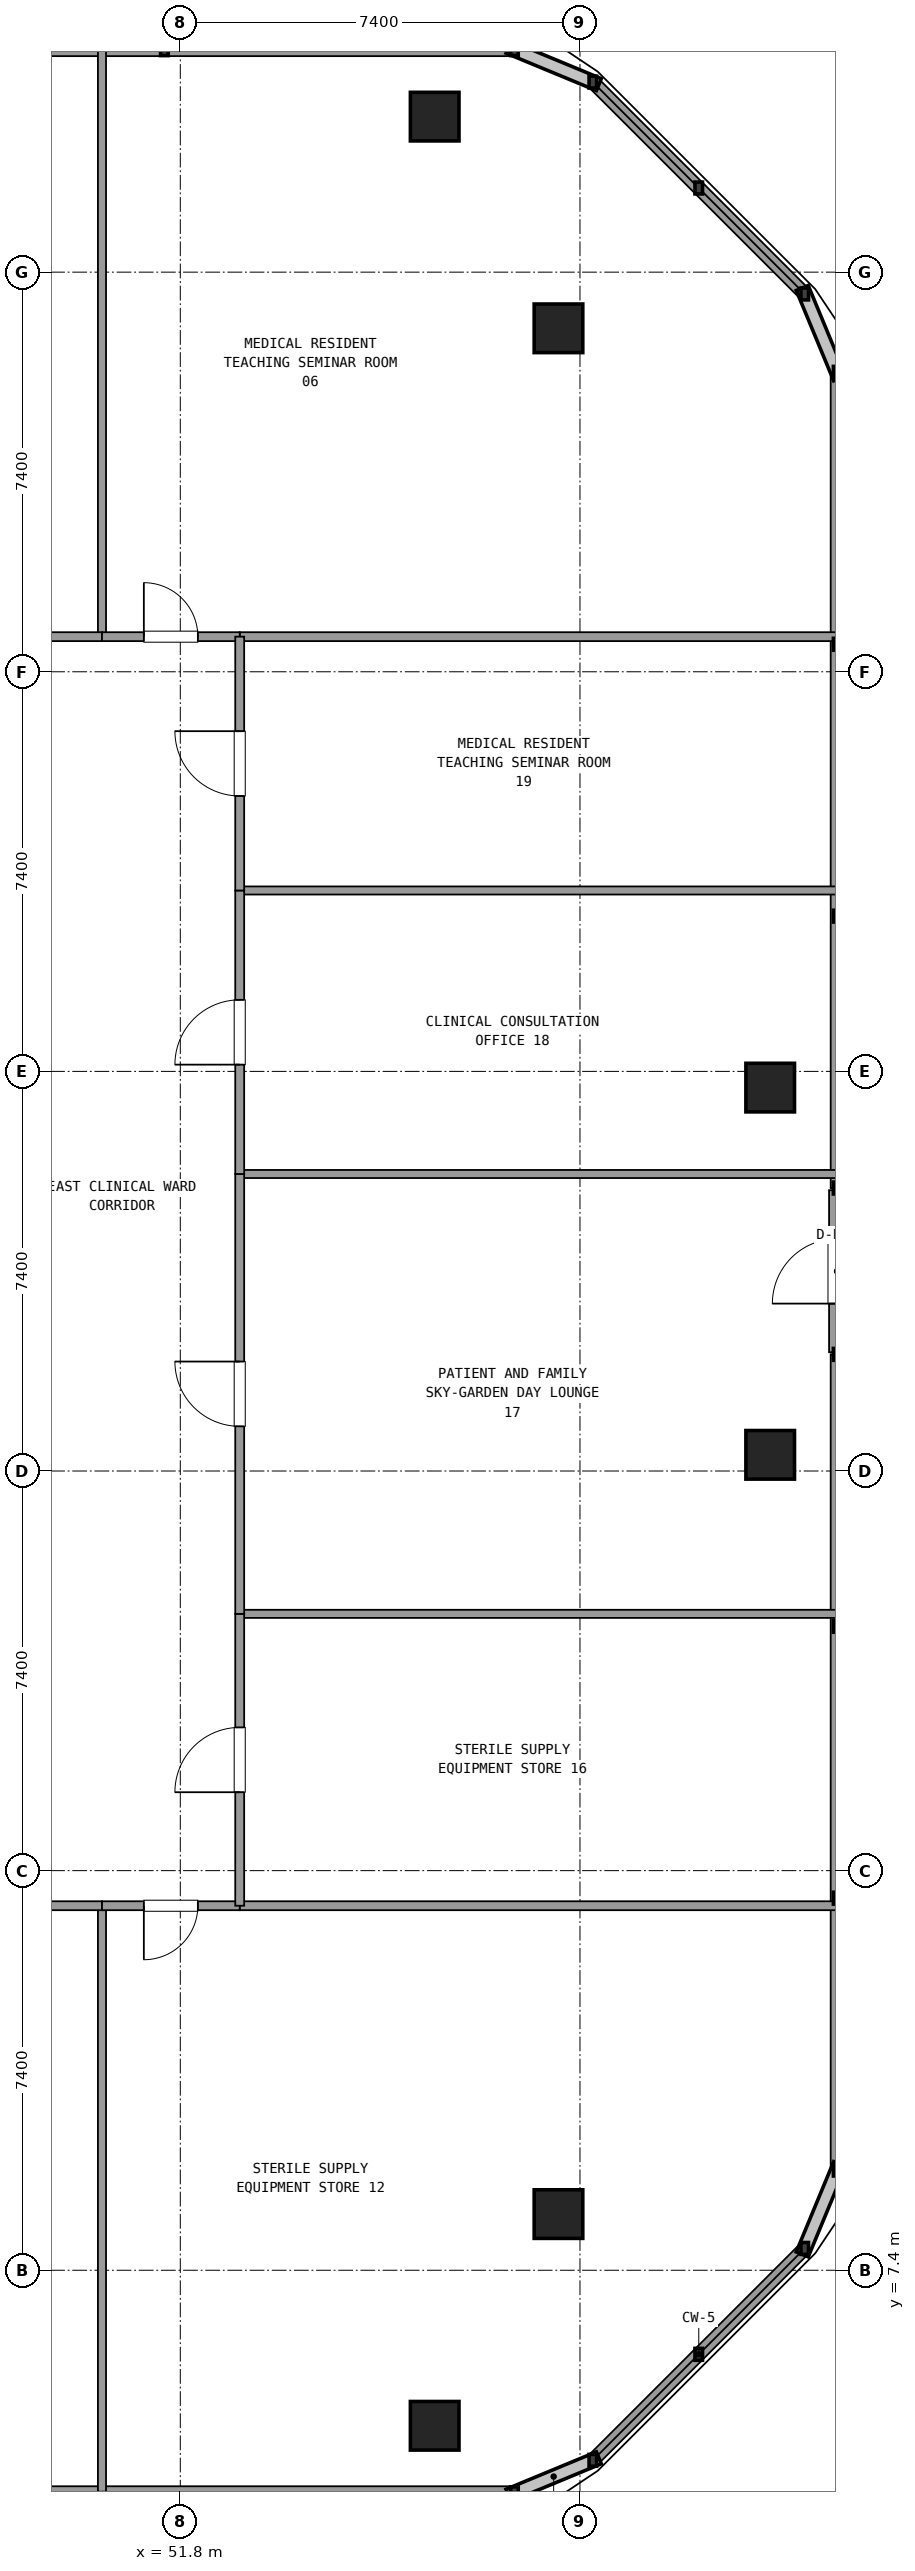
"""IFC4 building model, lengths in metres.
Left out: names, types, materials, properties, quantities, classifications, styles, units other than length and angle.
Written with IfcOpenShell. Run it as: python <this file> out.ifc"""

import sys

from ifc_helpers import new_model, si_unit, direction, frame, frame_2d, origin, origin_2d, place, context, subcontext, project, spatial, rectangle, extrude, element, fill, save


model = new_model("IFC4")
c1 = context("Model", 3, precision=1e-05, world=origin(), true_north=direction((0.0, 1.0)))
c2 = subcontext(c1, "Body", "Model", "MODEL_VIEW")
j1 = project(units=[si_unit("LENGTHUNIT", "METRE"), si_unit("PLANEANGLEUNIT", "RADIAN")], contexts=[c1])
p1 = place(None, origin())
s1 = spatial("IfcSite", under=j1, at=p1, CompositionType="ELEMENT")
p2 = place(p1, origin())
s2 = spatial("IfcBuilding", under=s1, at=p2, CompositionType="ELEMENT")
p3 = place(p2, frame((0.0, 0.0, 225.18)))
s3 = spatial("IfcBuildingStorey", under=s2, at=p3, CompositionType="ELEMENT", Elevation=225.18)
for number, where, z_axis, x_axis in (
    (1, (56.51, 4.52, 0.0), (0.0, 0.0, 1.0), (1.0, 0.0, 0.0)),
    (2, (58.802, 8.44, 0.0), (0.0, 0.0, 1.0), (1.0, 0.0, 0.0)),
    (3, (62.722, 22.5, 0.0), (0.0, 0.0, 1.0), (1.0, 0.0, 0.0)),
    (4, (62.722, 29.3, 0.0), (0.0, 0.0, 1.0), (1.0, 0.0, 0.0)),
    (5, (58.802, 43.36, 0.0), (0.0, 0.0, 1.0), (1.0, 0.0, 0.0)),
    (6, (56.51, 47.28, 0.0), (0.0, 0.0, 1.0), (1.0, 0.0, 0.0)),
):
    element("IfcColumn", number, at=place(p3, frame(where, z_axis=z_axis, x_axis=x_axis)), inside=s3, PredefinedType="COLUMN", context=c2, shape_type="SweptSolid", body=[
        extrude(rectangle(XDim=0.9, YDim=0.9, at=origin_2d()), origin(), (0.0, 0.0, 1.0), 3.6),
    ])
p4 = place(p3, frame((16.013, 3.28, 0.0), z_axis=(0.0, 0.0, 1.0), x_axis=(1.0, 0.0, 0.0)))
e7 = element("IfcWall", 7, at=p4, inside=s3, PredefinedType="SOLIDWALL", context=c2, shape_type="SweptSolid", body=[
    extrude(rectangle(XDim=41.974, YDim=0.24, at=frame_2d((20.987, 0.0))), origin(), (0.0, 0.0, 1.0), 0.85),
])
p5 = place(p3, frame((59.438, 3.881, 0.0), z_axis=(0.0, 0.0, 1.0), x_axis=(0.707128783731, 0.707084777957, 0.0)))
e8 = element("IfcWall", 8, at=p5, inside=s3, PredefinedType="SOLIDWALL", context=c2, shape_type="SweptSolid", body=[
    extrude(rectangle(XDim=5.548, YDim=0.24, at=frame_2d((2.774, 0.0))), origin(), (0.0, 0.0, 1.0), 0.85),
])
p6 = place(p3, frame((63.962, 24.4, 0.0), z_axis=(0.0, 0.0, 1.0), x_axis=(0.0, 1.0, 0.0)))
e9 = element("IfcWall", 9, at=p6, inside=s3, PredefinedType="SOLIDWALL", context=c2, shape_type="SweptSolid", body=[
    extrude(rectangle(XDim=3.0, YDim=0.3, at=frame_2d((1.5, 0.0))), origin(), (0.0, 0.0, 1.0), 2.69),
])
p7 = place(p6, frame((0.9, 0.0, 0.0)))
e10 = element("IfcOpeningElement", 10, at=p7, cuts=e9, PredefinedType="OPENING", context=c2, shape_type="SweptSolid", body=[
    extrude(rectangle(XDim=1.2, YDim=2.2, at=frame_2d((0.6, 1.1))), frame((0.0, 0.16, 0.0), z_axis=(0.0, -1.0, 0.0), x_axis=(1.0, 0.0, 0.0)), (0.0, 0.0, 1.0), 0.32),
])
p8 = place(p3, frame((63.962, 9.255, 0.0), z_axis=(0.0, 0.0, 1.0), x_axis=(0.0, 1.0, 0.0)))
e11 = element("IfcWall", 11, at=p8, inside=s3, PredefinedType="SOLIDWALL", context=c2, shape_type="SweptSolid", body=[
    extrude(rectangle(XDim=15.105, YDim=0.24, at=frame_2d((7.553, 0.0))), origin(), (0.0, 0.0, 1.0), 0.85),
])
p9 = place(p3, frame((63.962, 27.44, 0.0), z_axis=(0.0, 0.0, 1.0), x_axis=(0.0, 1.0, 0.0)))
e12 = element("IfcWall", 12, at=p9, inside=s3, PredefinedType="SOLIDWALL", context=c2, shape_type="SweptSolid", body=[
    extrude(rectangle(XDim=15.105, YDim=0.24, at=frame_2d((7.552, 0.0))), origin(), (0.0, 0.0, 1.0), 0.85),
])
p10 = place(p3, frame((63.361, 43.996, 0.0), z_axis=(0.0, 0.0, 1.0), x_axis=(-0.707128783731, 0.707084777957, 0.0)))
e13 = element("IfcWall", 13, at=p10, inside=s3, PredefinedType="SOLIDWALL", context=c2, shape_type="SweptSolid", body=[
    extrude(rectangle(XDim=5.548, YDim=0.24, at=frame_2d((2.774, 0.0))), origin(), (0.0, 0.0, 1.0), 0.85),
])
p11 = place(p3, frame((57.987, 48.52, 0.0), z_axis=(0.0, 0.0, 1.0), x_axis=(-1.0, 0.0, 0.0)))
e14 = element("IfcWall", 14, at=p11, inside=s3, PredefinedType="SOLIDWALL", context=c2, shape_type="SweptSolid", body=[
    extrude(rectangle(XDim=19.446, YDim=0.24, at=frame_2d((9.723, 0.0))), origin(), (0.0, 0.0, 1.0), 0.85),
])
for number, where, z_axis, x_axis in (
    (15, (52.9, 37.65, 0.0), (0.0, 0.0, 1.0), (1.0, 0.0, 0.0)),
    (16, (52.9, 14.15, 0.0), (0.0, 0.0, 1.0), (1.0, 0.0, 0.0)),
):
    element("IfcWall", number, at=place(p3, frame(where, z_axis=z_axis, x_axis=x_axis)), inside=s3, PredefinedType="PARTITIONING", context=c2, shape_type="SweptSolid", body=[
        extrude(rectangle(XDim=11.042, YDim=0.165, at=frame_2d((5.521, 0.0))), origin(), (0.0, 0.0, 1.0), 2.61),
    ])
p12 = place(p3, frame((50.35, 37.65, 0.0), z_axis=(0.0, 0.0, 1.0), x_axis=(0.0, 1.0, 0.0)))
e17 = element("IfcWall", 17, at=p12, inside=s3, PredefinedType="PARTITIONING", context=c2, shape_type="SweptSolid", body=[
    extrude(rectangle(XDim=10.85, YDim=0.15, at=frame_2d((5.425, 0.0))), origin(), (0.0, 0.0, 1.0), 2.61),
])
p13 = place(p3, frame((43.221, 37.65, 0.0), z_axis=(0.0, 0.0, 1.0), x_axis=(1.0, 0.0, 0.0)))
e18 = element("IfcWall", 18, at=p13, inside=s3, PredefinedType="PARTITIONING", context=c2, shape_type="SweptSolid", body=[
    extrude(rectangle(XDim=7.129, YDim=0.165, at=frame_2d((3.564, 0.0))), origin(), (0.0, 0.0, 1.0), 2.61),
])
p14 = place(p13, frame((2.965, 0.0, 0.0)))
e19 = element("IfcOpeningElement", 19, at=p14, cuts=e18, PredefinedType="OPENING", context=c2, shape_type="SweptSolid", body=[
    extrude(rectangle(XDim=1.2, YDim=2.15, at=frame_2d((0.6, 1.075))), frame((0.0, 0.093, 0.0), z_axis=(0.0, -1.0, 0.0), x_axis=(1.0, 0.0, 0.0)), (0.0, 0.0, 1.0), 0.185),
])
p15 = place(p3, frame((50.35, 37.65, 0.0), z_axis=(0.0, 0.0, 1.0), x_axis=(1.0, 0.0, 0.0)))
e20 = element("IfcWall", 20, at=p15, inside=s3, PredefinedType="PARTITIONING", context=c2, shape_type="SweptSolid", body=[
    extrude(rectangle(XDim=2.55, YDim=0.165, at=frame_2d((1.275, 0.0))), origin(), (0.0, 0.0, 1.0), 2.61),
])
p16 = place(p15, frame((0.775, 0.0, 0.0)))
e21 = element("IfcOpeningElement", 21, at=p16, cuts=e20, PredefinedType="OPENING", context=c2, shape_type="SweptSolid", body=[
    extrude(rectangle(XDim=1.0, YDim=2.15, at=frame_2d((0.5, 1.075))), frame((0.0, 0.093, 0.0), z_axis=(0.0, -1.0, 0.0), x_axis=(1.0, 0.0, 0.0)), (0.0, 0.0, 1.0), 0.185),
])
p17 = place(p3, frame((50.35, 14.15, 0.0), z_axis=(0.0, 0.0, 1.0), x_axis=(0.0, -1.0, 0.0)))
e22 = element("IfcWall", 22, at=p17, inside=s3, PredefinedType="PARTITIONING", context=c2, shape_type="SweptSolid", body=[
    extrude(rectangle(XDim=10.85, YDim=0.15, at=frame_2d((5.425, 0.0))), origin(), (0.0, 0.0, 1.0), 2.61),
])
p18 = place(p3, frame((43.221, 14.15, 0.0), z_axis=(0.0, 0.0, 1.0), x_axis=(1.0, 0.0, 0.0)))
e23 = element("IfcWall", 23, at=p18, inside=s3, PredefinedType="PARTITIONING", context=c2, shape_type="SweptSolid", body=[
    extrude(rectangle(XDim=7.129, YDim=0.165, at=frame_2d((3.564, 0.0))), origin(), (0.0, 0.0, 1.0), 2.61),
])
p19 = place(p18, frame((2.965, 0.0, 0.0)))
e24 = element("IfcOpeningElement", 24, at=p19, cuts=e23, PredefinedType="OPENING", context=c2, shape_type="SweptSolid", body=[
    extrude(rectangle(XDim=1.2, YDim=2.15, at=frame_2d((0.6, 1.075))), frame((0.0, 0.093, 0.0), z_axis=(0.0, -1.0, 0.0), x_axis=(1.0, 0.0, 0.0)), (0.0, 0.0, 1.0), 0.185),
])
p20 = place(p3, frame((50.35, 14.15, 0.0), z_axis=(0.0, 0.0, 1.0), x_axis=(1.0, 0.0, 0.0)))
e25 = element("IfcWall", 25, at=p20, inside=s3, PredefinedType="PARTITIONING", context=c2, shape_type="SweptSolid", body=[
    extrude(rectangle(XDim=2.55, YDim=0.165, at=frame_2d((1.275, 0.0))), origin(), (0.0, 0.0, 1.0), 2.61),
])
p21 = place(p20, frame((0.775, 0.0, 0.0)))
e26 = element("IfcOpeningElement", 26, at=p21, cuts=e25, PredefinedType="OPENING", context=c2, shape_type="SweptSolid", body=[
    extrude(rectangle(XDim=1.0, YDim=2.15, at=frame_2d((0.5, 1.075))), frame((0.0, 0.093, 0.0), z_axis=(0.0, -1.0, 0.0), x_axis=(1.0, 0.0, 0.0)), (0.0, 0.0, 1.0), 0.185),
])
p22 = place(p3, frame((52.9, 19.555, 0.0), z_axis=(0.0, 0.0, 1.0), x_axis=(1.0, 0.0, 0.0)))
e27 = element("IfcWall", 27, at=p22, inside=s3, PredefinedType="PARTITIONING", context=c2, shape_type="SweptSolid", body=[
    extrude(rectangle(XDim=11.042, YDim=0.15, at=frame_2d((5.521, 0.0))), origin(), (0.0, 0.0, 1.0), 2.61),
])
p23 = place(p3, frame((52.9, 14.15, 0.0), z_axis=(0.0, 0.0, 1.0), x_axis=(0.0, 1.0, 0.0)))
e28 = element("IfcWall", 28, at=p23, inside=s3, PredefinedType="PARTITIONING", context=c2, shape_type="SweptSolid", body=[
    extrude(rectangle(XDim=5.405, YDim=0.165, at=frame_2d((2.703, 0.0))), origin(), (0.0, 0.0, 1.0), 2.61),
])
p24 = place(p23, frame((2.102, 0.0, 0.0)))
e29 = element("IfcOpeningElement", 29, at=p24, cuts=e28, PredefinedType="OPENING", context=c2, shape_type="SweptSolid", body=[
    extrude(rectangle(XDim=1.2, YDim=2.15, at=frame_2d((0.6, 1.075))), frame((0.0, 0.093, 0.0), z_axis=(0.0, -1.0, 0.0), x_axis=(1.0, 0.0, 0.0)), (0.0, 0.0, 1.0), 0.185),
])
p25 = place(p3, frame((52.9, 27.7, 0.0), z_axis=(0.0, 0.0, 1.0), x_axis=(1.0, 0.0, 0.0)))
e30 = element("IfcWall", 30, at=p25, inside=s3, PredefinedType="PARTITIONING", context=c2, shape_type="SweptSolid", body=[
    extrude(rectangle(XDim=11.042, YDim=0.15, at=frame_2d((5.521, 0.0))), origin(), (0.0, 0.0, 1.0), 2.61),
])
p26 = place(p3, frame((52.9, 19.555, 0.0), z_axis=(0.0, 0.0, 1.0), x_axis=(0.0, 1.0, 0.0)))
e31 = element("IfcWall", 31, at=p26, inside=s3, PredefinedType="PARTITIONING", context=c2, shape_type="SweptSolid", body=[
    extrude(rectangle(XDim=8.145, YDim=0.165, at=frame_2d((4.073, 0.0))), origin(), (0.0, 0.0, 1.0), 2.61),
])
p27 = place(p26, frame((3.472, 0.0, 0.0)))
e32 = element("IfcOpeningElement", 32, at=p27, cuts=e31, PredefinedType="OPENING", context=c2, shape_type="SweptSolid", body=[
    extrude(rectangle(XDim=1.2, YDim=2.15, at=frame_2d((0.6, 1.075))), frame((0.0, 0.093, 0.0), z_axis=(0.0, -1.0, 0.0), x_axis=(1.0, 0.0, 0.0)), (0.0, 0.0, 1.0), 0.185),
])
p28 = place(p3, frame((52.9, 32.95, 0.0), z_axis=(0.0, 0.0, 1.0), x_axis=(1.0, 0.0, 0.0)))
e33 = element("IfcWall", 33, at=p28, inside=s3, PredefinedType="PARTITIONING", context=c2, shape_type="SweptSolid", body=[
    extrude(rectangle(XDim=11.042, YDim=0.15, at=frame_2d((5.521, 0.0))), origin(), (0.0, 0.0, 1.0), 2.61),
])
p29 = place(p3, frame((52.9, 27.7, 0.0), z_axis=(0.0, 0.0, 1.0), x_axis=(0.0, 1.0, 0.0)))
e34 = element("IfcWall", 34, at=p29, inside=s3, PredefinedType="PARTITIONING", context=c2, shape_type="SweptSolid", body=[
    extrude(rectangle(XDim=5.25, YDim=0.165, at=frame_2d((2.625, 0.0))), origin(), (0.0, 0.0, 1.0), 2.61),
])
p30 = place(p29, frame((2.025, 0.0, 0.0)))
e35 = element("IfcOpeningElement", 35, at=p30, cuts=e34, PredefinedType="OPENING", context=c2, shape_type="SweptSolid", body=[
    extrude(rectangle(XDim=1.2, YDim=2.15, at=frame_2d((0.6, 1.075))), frame((0.0, 0.093, 0.0), z_axis=(0.0, -1.0, 0.0), x_axis=(1.0, 0.0, 0.0)), (0.0, 0.0, 1.0), 0.185),
])
p31 = place(p3, frame((52.9, 32.95, 0.0), z_axis=(0.0, 0.0, 1.0), x_axis=(0.0, 1.0, 0.0)))
e36 = element("IfcWall", 36, at=p31, inside=s3, PredefinedType="PARTITIONING", context=c2, shape_type="SweptSolid", body=[
    extrude(rectangle(XDim=4.7, YDim=0.165, at=frame_2d((2.35, 0.0))), origin(), (0.0, 0.0, 1.0), 2.61),
])
p32 = place(p31, frame((1.75, 0.0, 0.0)))
e37 = element("IfcOpeningElement", 37, at=p32, cuts=e36, PredefinedType="OPENING", context=c2, shape_type="SweptSolid", body=[
    extrude(rectangle(XDim=1.2, YDim=2.15, at=frame_2d((0.6, 1.075))), frame((0.0, 0.093, 0.0), z_axis=(0.0, -1.0, 0.0), x_axis=(1.0, 0.0, 0.0)), (0.0, 0.0, 1.0), 0.185),
])
p33 = place(p16, origin())
e38 = element("IfcDoor", 38, at=p33, inside=s3, OperationType="SINGLE_SWING_LEFT", PredefinedType="DOOR", context=c2, shape_type="SweptSolid", body=[
    extrude(rectangle(XDim=1.0, YDim=2.15, at=frame_2d((0.5, 1.075))), frame((0.0, 0.025, 0.0), z_axis=(0.0, -1.0, 0.0), x_axis=(1.0, 0.0, 0.0)), (0.0, 0.0, 1.0), 0.05),
])
fill(e21, e38)
p34 = place(p21, frame((1.0, 0.0, 0.0), z_axis=(0.0, 0.0, 1.0), x_axis=(-1.0, 0.0, 0.0)))
e39 = element("IfcDoor", 39, at=p34, inside=s3, OperationType="SINGLE_SWING_LEFT", PredefinedType="DOOR", context=c2, shape_type="SweptSolid", body=[
    extrude(rectangle(XDim=1.0, YDim=2.15, at=frame_2d((0.5, 1.075))), frame((0.0, 0.025, 0.0), z_axis=(0.0, -1.0, 0.0), x_axis=(1.0, 0.0, 0.0)), (0.0, 0.0, 1.0), 0.05),
])
fill(e26, e39)
p35 = place(p24, origin())
e40 = element("IfcDoor", 40, at=p35, inside=s3, OperationType="SINGLE_SWING_LEFT", PredefinedType="DOOR", context=c2, shape_type="SweptSolid", body=[
    extrude(rectangle(XDim=1.2, YDim=2.15, at=frame_2d((0.6, 1.075))), frame((0.0, 0.025, 0.0), z_axis=(0.0, -1.0, 0.0), x_axis=(1.0, 0.0, 0.0)), (0.0, 0.0, 1.0), 0.05),
])
fill(e29, e40)
p36 = place(p27, origin())
e41 = element("IfcDoor", 41, at=p36, inside=s3, OperationType="SINGLE_SWING_RIGHT", PredefinedType="DOOR", context=c2, shape_type="SweptSolid", body=[
    extrude(rectangle(XDim=1.2, YDim=2.15, at=frame_2d((0.6, 1.075))), frame((0.0, 0.025, 0.0), z_axis=(0.0, -1.0, 0.0), x_axis=(1.0, 0.0, 0.0)), (0.0, 0.0, 1.0), 0.05),
])
fill(e32, e41)
p37 = place(p30, origin())
e42 = element("IfcDoor", 42, at=p37, inside=s3, OperationType="SINGLE_SWING_LEFT", PredefinedType="DOOR", context=c2, shape_type="SweptSolid", body=[
    extrude(rectangle(XDim=1.2, YDim=2.15, at=frame_2d((0.6, 1.075))), frame((0.0, 0.025, 0.0), z_axis=(0.0, -1.0, 0.0), x_axis=(1.0, 0.0, 0.0)), (0.0, 0.0, 1.0), 0.05),
])
fill(e35, e42)
p38 = place(p32, origin())
e43 = element("IfcDoor", 43, at=p38, inside=s3, OperationType="SINGLE_SWING_RIGHT", PredefinedType="DOOR", context=c2, shape_type="SweptSolid", body=[
    extrude(rectangle(XDim=1.2, YDim=2.15, at=frame_2d((0.6, 1.075))), frame((0.0, 0.025, 0.0), z_axis=(0.0, -1.0, 0.0), x_axis=(1.0, 0.0, 0.0)), (0.0, 0.0, 1.0), 0.05),
])
fill(e37, e43)
save(model, sys.argv[1])
